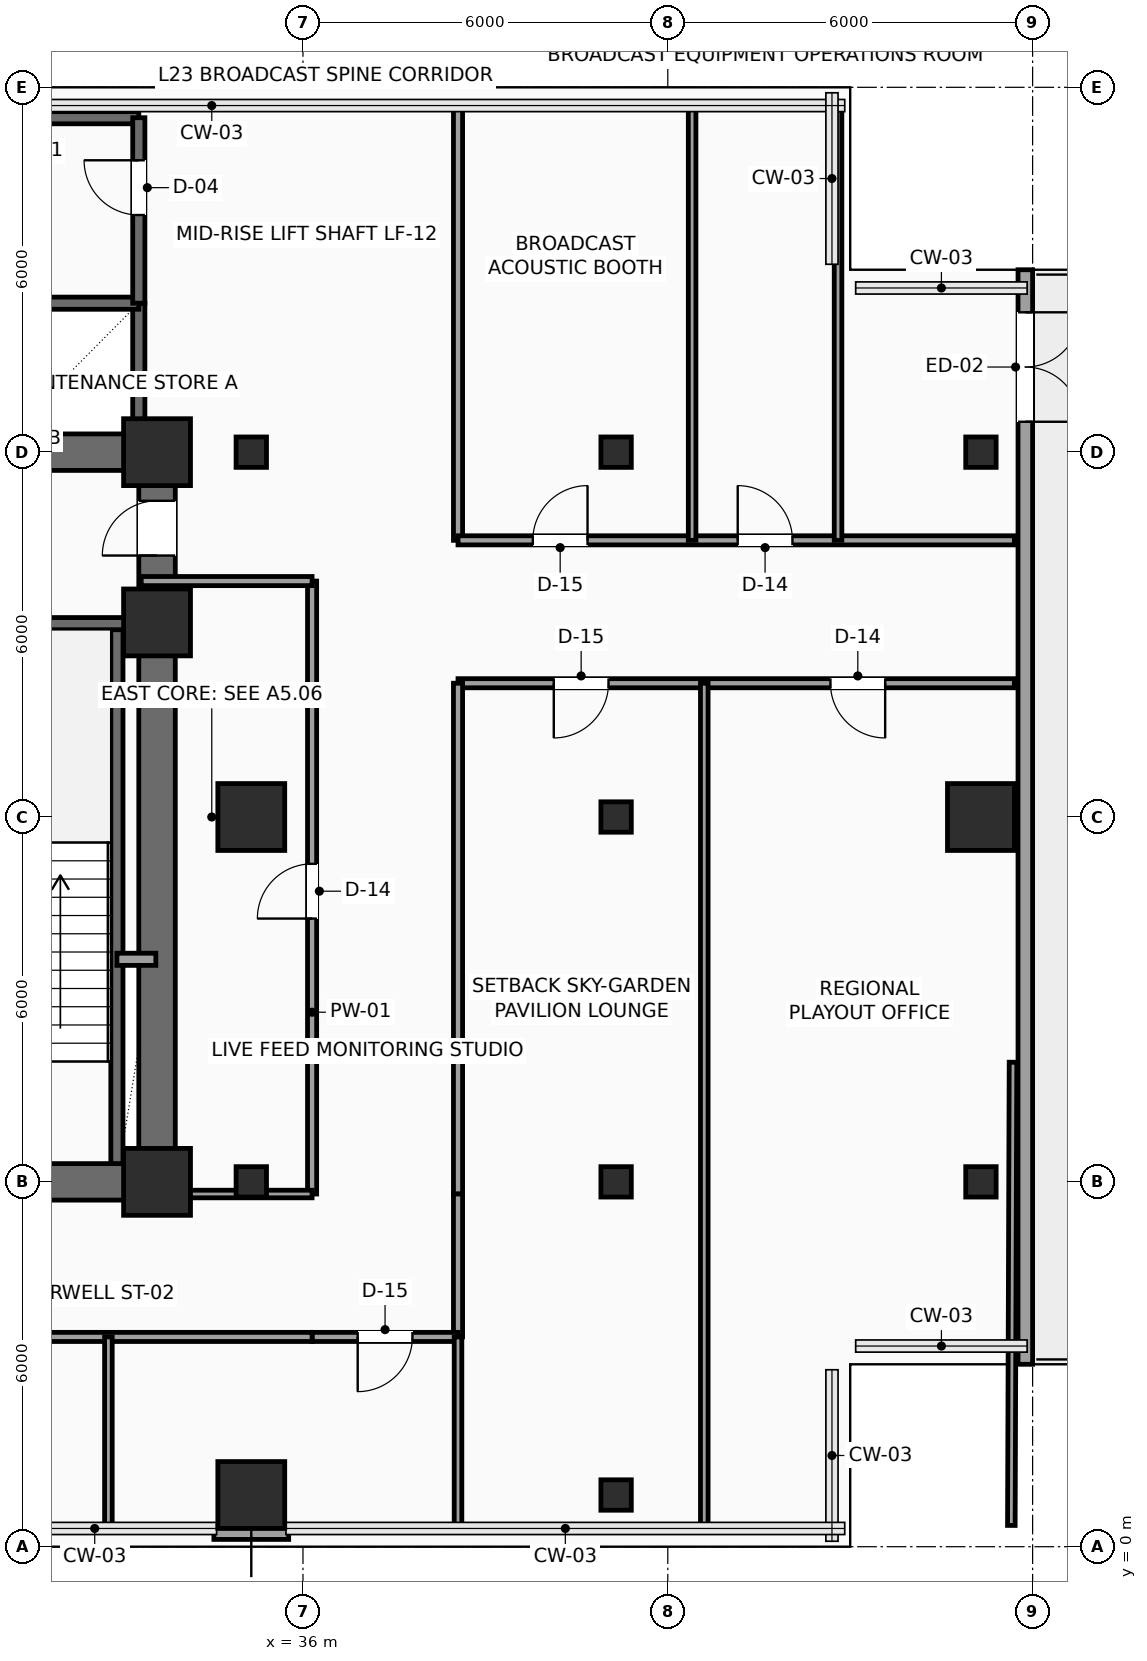
"""IFC4 building model, lengths in metres.
Left out: names, types, materials, properties, quantities, classifications, styles, units other than length and angle.
Written with IfcOpenShell. Run it as: python <this file> out.ifc"""

import sys

from ifc_helpers import new_model, si_unit, direction, frame, frame_2d, origin, origin_2d, place, context, subcontext, project, spatial, rectangle, hollow_rectangle, extrude, element, fill, save


model = new_model("IFC4")
c1 = context("Model", 3, precision=1e-05, world=origin(), true_north=direction((0.0, 1.0)))
c2 = subcontext(c1, "Body", "Model", "MODEL_VIEW")
j1 = project(units=[si_unit("LENGTHUNIT", "METRE"), si_unit("PLANEANGLEUNIT", "RADIAN")], contexts=[c1])
p1 = place(None, origin())
s1 = spatial("IfcSite", under=j1, at=p1, CompositionType="ELEMENT")
p2 = place(p1, origin())
s2 = spatial("IfcBuilding", under=s1, at=p2, CompositionType="ELEMENT")
p3 = place(p2, frame((0.0, 0.0, 99.6)))
s3 = spatial("IfcBuildingStorey", under=s2, at=p3, CompositionType="ELEMENT", Elevation=99.6)
for number, where, z_axis, x_axis in (
    (1, (33.6, 6.0, 0.0), (0.0, 0.0, 1.0), (1.0, 0.0, 0.0)),
    (2, (33.6, 15.2, 0.0), (0.0, 0.0, 1.0), (1.0, 0.0, 0.0)),
    (3, (33.6, 18.0, 0.0), (0.0, 0.0, 1.0), (1.0, 0.0, 0.0)),
    (4, (35.15, 0.85, 0.0), (0.0, 0.0, 1.0), (1.0, 0.0, 0.0)),
):
    element("IfcColumn", number, at=place(p3, frame(where, z_axis=z_axis, x_axis=x_axis)), inside=s3, PredefinedType="COLUMN", context=c2, shape_type="SweptSolid", body=[
        extrude(rectangle(XDim=1.1, YDim=1.1, at=origin_2d()), origin(), (0.0, 0.0, 1.0), 3.75),
    ])
p4 = place(p3, frame((35.15, 6.0, 0.0), z_axis=(0.0, 0.0, 1.0), x_axis=(1.0, 0.0, 0.0)))
e5 = element("IfcColumn", 5, at=p4, inside=s3, PredefinedType="COLUMN", context=c2, shape_type="SweptSolid", body=[
    extrude(hollow_rectangle(XDim=0.5, YDim=0.5, WallThickness=0.025, InnerFilletRadius=0.025, OuterFilletRadius=0.04, at=origin_2d()), origin(), (0.0, 0.0, 1.0), 3.75),
])
p5 = place(p3, frame((35.15, 12.0, 0.0), z_axis=(0.0, 0.0, 1.0), x_axis=(1.0, 0.0, 0.0)))
e6 = element("IfcColumn", 6, at=p5, inside=s3, PredefinedType="COLUMN", context=c2, shape_type="SweptSolid", body=[
    extrude(rectangle(XDim=1.1, YDim=1.1, at=origin_2d()), origin(), (0.0, 0.0, 1.0), 3.75),
])
for number, where, z_axis, x_axis in (
    (7, (35.15, 18.0, 0.0), (0.0, 0.0, 1.0), (1.0, 0.0, 0.0)),
    (8, (41.15, 0.85, 0.0), (0.0, 0.0, 1.0), (1.0, 0.0, 0.0)),
    (9, (41.15, 6.0, 0.0), (0.0, 0.0, 1.0), (1.0, 0.0, 0.0)),
    (10, (41.15, 12.0, 0.0), (0.0, 0.0, 1.0), (1.0, 0.0, 0.0)),
    (11, (41.15, 18.0, 0.0), (0.0, 0.0, 1.0), (1.0, 0.0, 0.0)),
    (12, (47.15, 6.0, 0.0), (0.0, 0.0, 1.0), (1.0, 0.0, 0.0)),
):
    element("IfcColumn", number, at=place(p3, frame(where, z_axis=z_axis, x_axis=x_axis)), inside=s3, PredefinedType="COLUMN", context=c2, shape_type="SweptSolid", body=[
        extrude(hollow_rectangle(XDim=0.5, YDim=0.5, WallThickness=0.025, InnerFilletRadius=0.025, OuterFilletRadius=0.04, at=origin_2d()), origin(), (0.0, 0.0, 1.0), 3.75),
    ])
p6 = place(p3, frame((47.15, 12.0, 0.0), z_axis=(0.0, 0.0, 1.0), x_axis=(1.0, 0.0, 0.0)))
e13 = element("IfcColumn", 13, at=p6, inside=s3, PredefinedType="COLUMN", context=c2, shape_type="SweptSolid", body=[
    extrude(rectangle(XDim=1.1, YDim=1.1, at=origin_2d()), origin(), (0.0, 0.0, 1.0), 3.75),
])
p7 = place(p3, frame((47.15, 18.0, 0.0), z_axis=(0.0, 0.0, 1.0), x_axis=(1.0, 0.0, 0.0)))
e14 = element("IfcColumn", 14, at=p7, inside=s3, PredefinedType="COLUMN", context=c2, shape_type="SweptSolid", body=[
    extrude(hollow_rectangle(XDim=0.5, YDim=0.5, WallThickness=0.025, InnerFilletRadius=0.025, OuterFilletRadius=0.04, at=origin_2d()), origin(), (0.0, 0.0, 1.0), 3.75),
])
p8 = place(p3, frame((47.88, 21.0, 0.0), z_axis=(0.0, 0.0, 1.0), x_axis=(0.0, -1.0, 0.0)))
e15 = element("IfcWall", 15, at=p8, inside=s3, PredefinedType="SOLIDWALL", context=c2, shape_type="SweptSolid", body=[
    extrude(rectangle(XDim=18.0, YDim=0.24, at=frame_2d((9.0, 0.0))), origin(), (0.0, 0.0, 1.0), 3.525),
])
p9 = place(p8, frame((0.7, 0.0, 0.0)))
e16 = element("IfcOpeningElement", 16, at=p9, cuts=e15, PredefinedType="OPENING", context=c2, shape_type="SweptSolid", body=[
    extrude(rectangle(XDim=1.8, YDim=2.4, at=frame_2d((0.9, 1.2))), frame((0.0, 0.13, 0.0), z_axis=(0.0, -1.0, 0.0), x_axis=(1.0, 0.0, 0.0)), (0.0, 0.0, 1.0), 0.26),
])
p10 = place(p3, frame((35.765, 0.24, 0.0), z_axis=(0.0, 0.0, 1.0), x_axis=(-1.0, 0.0, 0.0)))
e17 = element("IfcWall", 17, at=p10, inside=s3, PredefinedType="SOLIDWALL", context=c2, shape_type="SweptSolid", body=[
    extrude(rectangle(XDim=1.23, YDim=0.24, at=frame_2d((0.615, 0.0))), origin(), (0.0, 0.0, 1.0), 3.525),
])
for number, where, z_axis, x_axis in (
    (18, (24.0, 6.0, 0.0), (0.0, 0.0, 1.0), (1.0, 0.0, 0.0)),
    (19, (24.0, 18.0, 0.0), (0.0, 0.0, 1.0), (1.0, 0.0, 0.0)),
):
    element("IfcWall", number, at=place(p3, frame(where, z_axis=z_axis, x_axis=x_axis)), inside=s3, PredefinedType="SHEAR", context=c2, shape_type="SweptSolid", body=[
        extrude(rectangle(XDim=9.6, YDim=0.6, at=frame_2d((4.8, 0.0))), origin(), (0.0, 0.0, 1.0), 3.525),
    ])
p11 = place(p3, frame((33.6, 6.0, 0.0), z_axis=(0.0, 0.0, 1.0), x_axis=(0.0, 1.0, 0.0)))
e20 = element("IfcWall", 20, at=p11, inside=s3, PredefinedType="SHEAR", context=c2, shape_type="SweptSolid", body=[
    extrude(rectangle(XDim=12.0, YDim=0.6, at=frame_2d((6.0, 0.0))), origin(), (0.0, 0.0, 1.0), 3.525),
])
p12 = place(p11, frame((10.3, 0.0, 0.0)))
e21 = element("IfcOpeningElement", 21, at=p12, cuts=e20, PredefinedType="OPENING", context=c2, shape_type="SweptSolid", body=[
    extrude(rectangle(XDim=0.9, YDim=2.15, at=frame_2d((0.45, 1.075))), frame((0.0, 0.31, 0.0), z_axis=(0.0, -1.0, 0.0), x_axis=(1.0, 0.0, 0.0)), (0.0, 0.0, 1.0), 0.62),
])
p13 = place(p3, frame((32.94, 6.3, 0.0), z_axis=(0.0, 0.0, 1.0), x_axis=(0.0, 1.0, 0.0)))
e22 = element("IfcWall", 22, at=p13, inside=s3, PredefinedType="SHEAR", context=c2, shape_type="SweptSolid", body=[
    extrude(rectangle(XDim=8.88, YDim=0.2, at=frame_2d((4.44, 0.0))), origin(), (0.0, 0.0, 1.0), 3.525),
])
p14 = place(p3, frame((29.26, 15.18, 0.0), z_axis=(0.0, 0.0, 1.0), x_axis=(1.0, 0.0, 0.0)))
e23 = element("IfcWall", 23, at=p14, inside=s3, PredefinedType="SHEAR", context=c2, shape_type="SweptSolid", body=[
    extrude(rectangle(XDim=4.04, YDim=0.2, at=frame_2d((2.02, 0.0))), origin(), (0.0, 0.0, 1.0), 3.525),
])
p15 = place(p3, frame((32.94, 9.66, 0.0), z_axis=(0.0, 0.0, 1.0), x_axis=(1.0, 0.0, 0.0)))
e24 = element("IfcWall", 24, at=p15, inside=s3, PredefinedType="SOLIDWALL", context=c2, shape_type="SweptSolid", body=[
    extrude(rectangle(XDim=0.64, YDim=0.2, at=frame_2d((0.32, 0.0))), origin(), (0.0, 0.0, 1.0), 3.525),
])
p16 = place(p3, frame((33.3, 18.1, 0.0), z_axis=(0.0, 0.0, 1.0), x_axis=(0.0, 1.0, 0.0)))
e25 = element("IfcWall", 25, at=p16, inside=s3, PredefinedType="SHEAR", context=c2, shape_type="SweptSolid", body=[
    extrude(rectangle(XDim=2.35, YDim=0.2, at=frame_2d((1.175, 0.0))), origin(), (0.0, 0.0, 1.0), 3.525),
])
p17 = place(p3, frame((24.25, 20.45, 0.0), z_axis=(0.0, 0.0, 1.0), x_axis=(1.0, 0.0, 0.0)))
e26 = element("IfcWall", 26, at=p17, inside=s3, PredefinedType="SHEAR", context=c2, shape_type="SweptSolid", body=[
    extrude(rectangle(XDim=9.05, YDim=0.2, at=frame_2d((4.525, 0.0))), origin(), (0.0, 0.0, 1.0), 3.525),
])
p18 = place(p3, frame((24.15, 23.5, 0.0), z_axis=(0.0, 0.0, 1.0), x_axis=(1.0, 0.0, 0.0)))
e27 = element("IfcWall", 27, at=p18, inside=s3, PredefinedType="SHEAR", context=c2, shape_type="SweptSolid", body=[
    extrude(rectangle(XDim=9.15, YDim=0.2, at=frame_2d((4.575, 0.0))), origin(), (0.0, 0.0, 1.0), 3.525),
])
p19 = place(p3, frame((33.3, 20.45, 0.0), z_axis=(0.0, 0.0, 1.0), x_axis=(0.0, 1.0, 0.0)))
e28 = element("IfcWall", 28, at=p19, inside=s3, PredefinedType="SHEAR", context=c2, shape_type="SweptSolid", body=[
    extrude(rectangle(XDim=3.05, YDim=0.2, at=frame_2d((1.525, 0.0))), origin(), (0.0, 0.0, 1.0), 3.525),
])
p20 = place(p19, frame((1.45, 0.0, 0.0)))
e29 = element("IfcOpeningElement", 29, at=p20, cuts=e28, PredefinedType="OPENING", context=c2, shape_type="SweptSolid", body=[
    extrude(rectangle(XDim=0.9, YDim=2.15, at=frame_2d((0.45, 1.075))), frame((0.0, 0.11, 0.0), z_axis=(0.0, -1.0, 0.0), x_axis=(1.0, 0.0, 0.0)), (0.0, 0.0, 1.0), 0.22),
])
p21 = place(p3, frame((36.15, 5.8, 0.0), z_axis=(0.0, 0.0, 1.0), x_axis=(0.0, 1.0, 0.0)))
e30 = element("IfcWall", 30, at=p21, inside=s3, PredefinedType="PARTITIONING", context=c2, shape_type="SweptSolid", body=[
    extrude(rectangle(XDim=10.08, YDim=0.15, at=frame_2d((5.04, 0.0))), origin(), (0.0, 0.0, 1.0), 3.525),
])
p22 = place(p21, frame((4.53, 0.0, 0.0)))
e31 = element("IfcOpeningElement", 31, at=p22, cuts=e30, PredefinedType="OPENING", context=c2, shape_type="SweptSolid", body=[
    extrude(rectangle(XDim=0.9, YDim=2.1, at=frame_2d((0.45, 1.05))), frame((0.0, 0.085, 0.0), z_axis=(0.0, -1.0, 0.0), x_axis=(1.0, 0.0, 0.0)), (0.0, 0.0, 1.0), 0.17),
])
p23 = place(p3, frame((36.15, 15.88, 0.0), z_axis=(0.0, 0.0, 1.0), x_axis=(-1.0, 0.0, 0.0)))
e32 = element("IfcWall", 32, at=p23, inside=s3, PredefinedType="PARTITIONING", context=c2, shape_type="SweptSolid", body=[
    extrude(rectangle(XDim=2.81, YDim=0.15, at=frame_2d((1.405, 0.0))), origin(), (0.0, 0.0, 1.0), 3.525),
])
p24 = place(p3, frame((38.55, 23.7, 0.0), z_axis=(0.0, 0.0, 1.0), x_axis=(0.0, -1.0, 0.0)))
e33 = element("IfcWall", 33, at=p24, inside=s3, PredefinedType="PARTITIONING", context=c2, shape_type="SweptSolid", body=[
    extrude(rectangle(XDim=7.15, YDim=0.15, at=frame_2d((3.575, 0.0))), origin(), (0.0, 0.0, 1.0), 3.525),
])
p25 = place(p3, frame((38.55, 16.55, 0.0), z_axis=(0.0, 0.0, 1.0), x_axis=(1.0, 0.0, 0.0)))
e34 = element("IfcWall", 34, at=p25, inside=s3, PredefinedType="PARTITIONING", context=c2, shape_type="SweptSolid", body=[
    extrude(rectangle(XDim=9.15, YDim=0.15, at=frame_2d((4.575, 0.0))), origin(), (0.0, 0.0, 1.0), 3.525),
])
p26 = place(p25, frame((1.23, 0.0, 0.0)))
e35 = element("IfcOpeningElement", 35, at=p26, cuts=e34, PredefinedType="OPENING", context=c2, shape_type="SweptSolid", body=[
    extrude(rectangle(XDim=0.9, YDim=2.1, at=frame_2d((0.45, 1.05))), frame((0.0, 0.085, 0.0), z_axis=(0.0, -1.0, 0.0), x_axis=(1.0, 0.0, 0.0)), (0.0, 0.0, 1.0), 0.17),
])
p27 = place(p25, frame((4.6, 0.0, 0.0)))
e36 = element("IfcOpeningElement", 36, at=p27, cuts=e34, PredefinedType="OPENING", context=c2, shape_type="SweptSolid", body=[
    extrude(rectangle(XDim=0.9, YDim=2.1, at=frame_2d((0.45, 1.05))), frame((0.0, 0.085, 0.0), z_axis=(0.0, -1.0, 0.0), x_axis=(1.0, 0.0, 0.0)), (0.0, 0.0, 1.0), 0.17),
])
p28 = place(p3, frame((47.7, 14.2, 0.0), z_axis=(0.0, 0.0, 1.0), x_axis=(-1.0, 0.0, 0.0)))
e37 = element("IfcWall", 37, at=p28, inside=s3, PredefinedType="PARTITIONING", context=c2, shape_type="SweptSolid", body=[
    extrude(rectangle(XDim=9.15, YDim=0.15, at=frame_2d((4.575, 0.0))), origin(), (0.0, 0.0, 1.0), 3.525),
])
p29 = place(p28, frame((6.675, 0.0, 0.0)))
e38 = element("IfcOpeningElement", 38, at=p29, cuts=e37, PredefinedType="OPENING", context=c2, shape_type="SweptSolid", body=[
    extrude(rectangle(XDim=0.9, YDim=2.1, at=frame_2d((0.45, 1.05))), frame((0.0, 0.085, 0.0), z_axis=(0.0, -1.0, 0.0), x_axis=(1.0, 0.0, 0.0)), (0.0, 0.0, 1.0), 0.17),
])
p30 = place(p28, frame((2.125, 0.0, 0.0)))
e39 = element("IfcOpeningElement", 39, at=p30, cuts=e37, PredefinedType="OPENING", context=c2, shape_type="SweptSolid", body=[
    extrude(rectangle(XDim=0.9, YDim=2.1, at=frame_2d((0.45, 1.05))), frame((0.0, 0.085, 0.0), z_axis=(0.0, -1.0, 0.0), x_axis=(1.0, 0.0, 0.0)), (0.0, 0.0, 1.0), 0.17),
])
p31 = place(p3, frame((38.55, 14.2, 0.0), z_axis=(0.0, 0.0, 1.0), x_axis=(0.0, -1.0, 0.0)))
e40 = element("IfcWall", 40, at=p31, inside=s3, PredefinedType="PARTITIONING", context=c2, shape_type="SweptSolid", body=[
    extrude(rectangle(XDim=8.4, YDim=0.15, at=frame_2d((4.2, 0.0))), origin(), (0.0, 0.0, 1.0), 3.525),
])
p32 = place(p3, frame((38.55, 5.8, 0.0), z_axis=(0.0, 0.0, 1.0), x_axis=(0.0, -1.0, 0.0)))
e41 = element("IfcWall", 41, at=p32, inside=s3, PredefinedType="PARTITIONING", context=c2, shape_type="SweptSolid", body=[
    extrude(rectangle(XDim=2.35, YDim=0.15, at=frame_2d((1.175, 0.0))), origin(), (0.0, 0.0, 1.0), 3.525),
])
p33 = place(p3, frame((38.55, 3.45, 0.0), z_axis=(0.0, 0.0, 1.0), x_axis=(-1.0, 0.0, 0.0)))
e42 = element("IfcWall", 42, at=p33, inside=s3, PredefinedType="PARTITIONING", context=c2, shape_type="SweptSolid", body=[
    extrude(rectangle(XDim=2.4, YDim=0.15, at=frame_2d((1.2, 0.0))), origin(), (0.0, 0.0, 1.0), 3.067),
])
p34 = place(p33, frame((0.75, 0.0, 0.0)))
e43 = element("IfcOpeningElement", 43, at=p34, cuts=e42, PredefinedType="OPENING", context=c2, shape_type="SweptSolid", body=[
    extrude(rectangle(XDim=0.9, YDim=2.1, at=frame_2d((0.45, 1.05))), frame((0.0, 0.085, 0.0), z_axis=(0.0, -1.0, 0.0), x_axis=(1.0, 0.0, 0.0)), (0.0, 0.0, 1.0), 0.17),
])
p35 = place(p3, frame((36.15, 3.45, 0.0), z_axis=(0.0, 0.0, 1.0), x_axis=(-1.0, 0.0, 0.0)))
e44 = element("IfcWall", 44, at=p35, inside=s3, PredefinedType="PARTITIONING", context=c2, shape_type="SweptSolid", body=[
    extrude(rectangle(XDim=14.6, YDim=0.15, at=frame_2d((7.3, 0.0))), origin(), (0.0, 0.0, 1.0), 3.067),
])
p36 = place(p35, frame((11.325, 0.0, 0.0)))
e45 = element("IfcOpeningElement", 45, at=p36, cuts=e44, PredefinedType="OPENING", context=c2, shape_type="SweptSolid", body=[
    extrude(rectangle(XDim=0.9, YDim=2.1, at=frame_2d((0.45, 1.05))), frame((0.0, 0.085, 0.0), z_axis=(0.0, -1.0, 0.0), x_axis=(1.0, 0.0, 0.0)), (0.0, 0.0, 1.0), 0.17),
])
p37 = place(p35, frame((5.7, 0.0, 0.0)))
e46 = element("IfcOpeningElement", 46, at=p37, cuts=e44, PredefinedType="OPENING", context=c2, shape_type="SweptSolid", body=[
    extrude(rectangle(XDim=0.9, YDim=2.1, at=frame_2d((0.45, 1.05))), frame((0.0, 0.085, 0.0), z_axis=(0.0, -1.0, 0.0), x_axis=(1.0, 0.0, 0.0)), (0.0, 0.0, 1.0), 0.17),
])
p38 = place(p3, frame((42.6, 0.3, 0.0), z_axis=(0.0, 0.0, 1.0), x_axis=(0.0, 1.0, 0.0)))
e47 = element("IfcWall", 47, at=p38, inside=s3, PredefinedType="PARTITIONING", context=c2, shape_type="SweptSolid", body=[
    extrude(rectangle(XDim=13.9, YDim=0.125, at=frame_2d((6.95, 0.0))), origin(), (0.0, 0.0, 1.0), 3.525),
])
p39 = place(p3, frame((47.65, 0.35, 0.0), z_axis=(0.0, 0.0, 1.0), x_axis=(0.003621655041, 0.999993441786, 0.0)))
e48 = element("IfcWall", 48, at=p39, inside=s3, PredefinedType="PARTITIONING", context=c2, shape_type="SweptSolid", body=[
    extrude(rectangle(XDim=7.617, YDim=0.125, at=frame_2d((3.809, 0.0))), origin(), (0.0, 0.0, 1.0), 3.525),
])
for number, where, z_axis, x_axis in (
    (49, (42.4, 16.55, 0.0), (0.0, 0.0, 1.0), (0.0, 1.0, 0.0)),
    (50, (44.8, 16.55, 0.0), (0.0, 0.0, 1.0), (0.0, 1.0, 0.0)),
):
    element("IfcWall", number, at=place(p3, frame(where, z_axis=z_axis, x_axis=x_axis)), inside=s3, PredefinedType="PARTITIONING", context=c2, shape_type="SweptSolid", body=[
        extrude(rectangle(XDim=7.15, YDim=0.125, at=frame_2d((3.575, 0.0))), origin(), (0.0, 0.0, 1.0), 3.525),
    ])
for number, where, z_axis, x_axis in (
    (51, (32.8, 0.3, 0.0), (0.0, 0.0, 1.0), (0.0, 1.0, 0.0)),
    (52, (38.55, 0.3, 0.0), (0.0, 0.0, 1.0), (0.0, 1.0, 0.0)),
):
    element("IfcWall", number, at=place(p3, frame(where, z_axis=z_axis, x_axis=x_axis)), inside=s3, PredefinedType="PARTITIONING", context=c2, shape_type="SweptSolid", body=[
        extrude(rectangle(XDim=3.15, YDim=0.125, at=frame_2d((1.575, 0.0))), origin(), (0.0, 0.0, 1.0), 3.525),
    ])
p40 = place(p3, frame((33.65, 5.8, 0.0), z_axis=(0.0, 0.0, 1.0), x_axis=(1.0, 0.0, 0.0)))
e53 = element("IfcWall", 53, at=p40, inside=s3, PredefinedType="PARTITIONING", context=c2, shape_type="SweptSolid", body=[
    extrude(rectangle(XDim=2.5, YDim=0.125, at=frame_2d((1.25, 0.0))), origin(), (0.0, 0.0, 1.0), 3.017),
])
p41 = place(p9, origin())
e54 = element("IfcDoor", 54, at=p41, inside=s3, OperationType="DOUBLE_DOOR_SINGLE_SWING", PredefinedType="DOOR", context=c2, shape_type="SweptSolid", body=[
    extrude(rectangle(XDim=1.8, YDim=2.4, at=frame_2d((0.9, 1.2))), frame((0.0, 0.025, 0.0), z_axis=(0.0, -1.0, 0.0), x_axis=(1.0, 0.0, 0.0)), (0.0, 0.0, 1.0), 0.05),
])
fill(e16, e54)
p42 = place(p12, origin())
e55 = element("IfcDoor", 55, at=p42, inside=s3, OperationType="SINGLE_SWING_LEFT", PredefinedType="DOOR", context=c2, shape_type="SweptSolid", body=[
    extrude(rectangle(XDim=0.9, YDim=2.15, at=frame_2d((0.45, 1.075))), frame((0.0, 0.025, 0.0), z_axis=(0.0, -1.0, 0.0), x_axis=(1.0, 0.0, 0.0)), (0.0, 0.0, 1.0), 0.05),
])
fill(e21, e55)
p43 = place(p20, origin())
e56 = element("IfcDoor", 56, at=p43, inside=s3, OperationType="SINGLE_SWING_RIGHT", PredefinedType="DOOR", context=c2, shape_type="SweptSolid", body=[
    extrude(rectangle(XDim=0.9, YDim=2.15, at=frame_2d((0.45, 1.075))), frame((0.0, 0.025, 0.0), z_axis=(0.0, -1.0, 0.0), x_axis=(1.0, 0.0, 0.0)), (0.0, 0.0, 1.0), 0.05),
])
fill(e29, e56)
p44 = place(p22, origin())
e57 = element("IfcDoor", 57, at=p44, inside=s3, OperationType="SINGLE_SWING_LEFT", PredefinedType="DOOR", context=c2, shape_type="SweptSolid", body=[
    extrude(rectangle(XDim=0.9, YDim=2.1, at=frame_2d((0.45, 1.05))), frame((0.0, 0.025, 0.0), z_axis=(0.0, -1.0, 0.0), x_axis=(1.0, 0.0, 0.0)), (0.0, 0.0, 1.0), 0.05),
])
fill(e31, e57)
p45 = place(p26, origin())
e58 = element("IfcDoor", 58, at=p45, inside=s3, OperationType="SINGLE_SWING_RIGHT", PredefinedType="DOOR", context=c2, shape_type="SweptSolid", body=[
    extrude(rectangle(XDim=0.9, YDim=2.1, at=frame_2d((0.45, 1.05))), frame((0.0, 0.025, 0.0), z_axis=(0.0, -1.0, 0.0), x_axis=(1.0, 0.0, 0.0)), (0.0, 0.0, 1.0), 0.05),
])
fill(e35, e58)
p46 = place(p27, origin())
e59 = element("IfcDoor", 59, at=p46, inside=s3, OperationType="SINGLE_SWING_LEFT", PredefinedType="DOOR", context=c2, shape_type="SweptSolid", body=[
    extrude(rectangle(XDim=0.9, YDim=2.1, at=frame_2d((0.45, 1.05))), frame((0.0, 0.025, 0.0), z_axis=(0.0, -1.0, 0.0), x_axis=(1.0, 0.0, 0.0)), (0.0, 0.0, 1.0), 0.05),
])
fill(e36, e59)
p47 = place(p29, origin())
e60 = element("IfcDoor", 60, at=p47, inside=s3, OperationType="SINGLE_SWING_RIGHT", PredefinedType="DOOR", context=c2, shape_type="SweptSolid", body=[
    extrude(rectangle(XDim=0.9, YDim=2.1, at=frame_2d((0.45, 1.05))), frame((0.0, 0.025, 0.0), z_axis=(0.0, -1.0, 0.0), x_axis=(1.0, 0.0, 0.0)), (0.0, 0.0, 1.0), 0.05),
])
fill(e38, e60)
p48 = place(p30, origin())
e61 = element("IfcDoor", 61, at=p48, inside=s3, OperationType="SINGLE_SWING_LEFT", PredefinedType="DOOR", context=c2, shape_type="SweptSolid", body=[
    extrude(rectangle(XDim=0.9, YDim=2.1, at=frame_2d((0.45, 1.05))), frame((0.0, 0.025, 0.0), z_axis=(0.0, -1.0, 0.0), x_axis=(1.0, 0.0, 0.0)), (0.0, 0.0, 1.0), 0.05),
])
fill(e39, e61)
p49 = place(p34, origin())
e62 = element("IfcDoor", 62, at=p49, inside=s3, OperationType="SINGLE_SWING_RIGHT", PredefinedType="DOOR", context=c2, shape_type="SweptSolid", body=[
    extrude(rectangle(XDim=0.9, YDim=2.1, at=frame_2d((0.45, 1.05))), frame((0.0, 0.025, 0.0), z_axis=(0.0, -1.0, 0.0), x_axis=(1.0, 0.0, 0.0)), (0.0, 0.0, 1.0), 0.05),
])
fill(e43, e62)
save(model, sys.argv[1])
